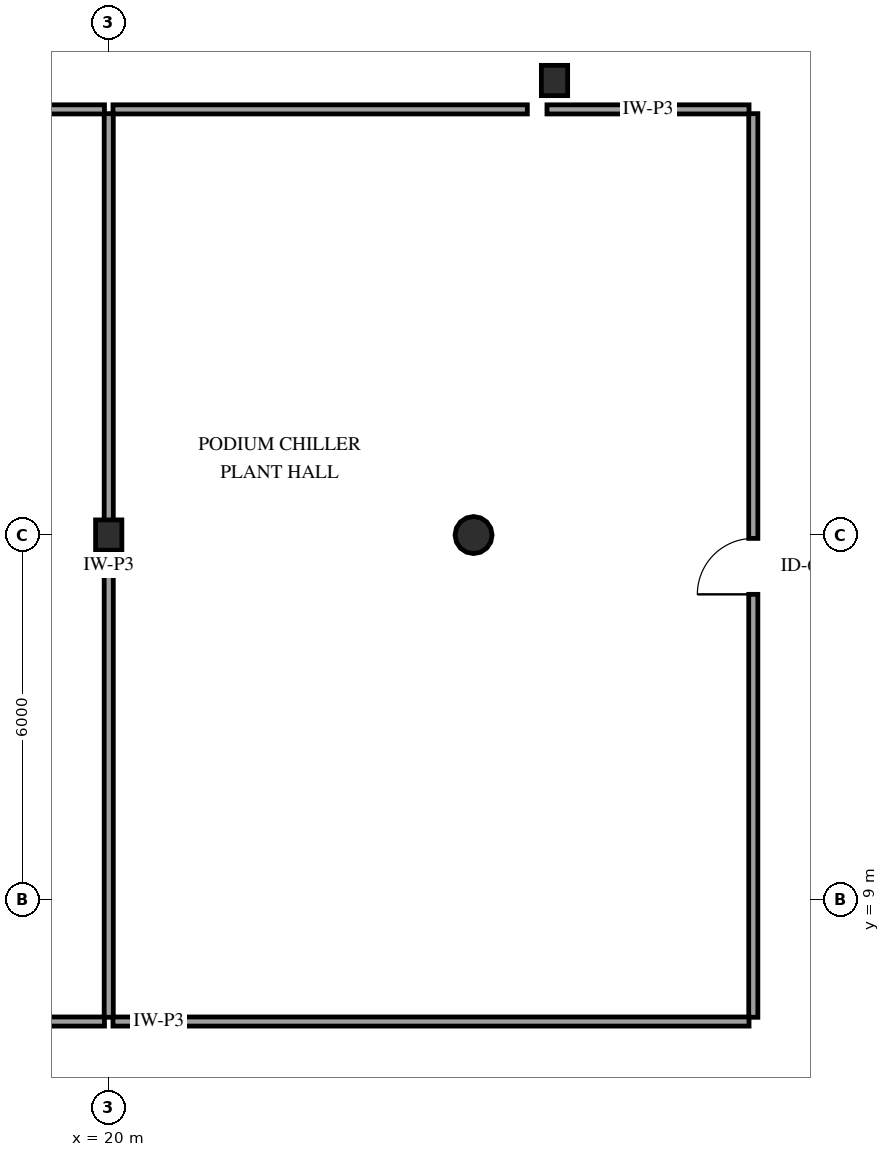
"""IFC4 building model, lengths in metres.
Left out: names, types, materials, properties, quantities, classifications, styles, units other than length and angle.
Written with IfcOpenShell. Run it as: python <this file> out.ifc"""

import sys

from ifc_helpers import new_model, si_unit, direction, frame, frame_2d, origin, origin_2d, place, context, subcontext, project, spatial, rectangle, hollow_circle, i_section, extrude, element, fill, save


model = new_model("IFC4")
c1 = context("Model", 3, precision=1e-05, world=origin(), true_north=direction((0.0, 1.0)))
c2 = subcontext(c1, "Body", "Model", "MODEL_VIEW")
j1 = project(units=[si_unit("LENGTHUNIT", "METRE"), si_unit("PLANEANGLEUNIT", "RADIAN")], contexts=[c1])
p1 = place(None, origin())
s1 = spatial("IfcSite", under=j1, at=p1, CompositionType="ELEMENT")
p2 = place(p1, origin())
s2 = spatial("IfcBuilding", under=s1, at=p2, CompositionType="ELEMENT")
p3 = place(p2, frame((0.0, 0.0, 25.2)))
s3 = spatial("IfcBuildingStorey", under=s2, at=p3, CompositionType="ELEMENT", Elevation=25.2)
p4 = place(p3, frame((20.0, 15.0, 0.0), z_axis=(0.0, 0.0, 1.0), x_axis=(1.0, 0.0, 0.0)))
e1 = element("IfcColumn", 1, at=p4, inside=s3, PredefinedType="COLUMN", context=c2, shape_type="SweptSolid", body=[
    extrude(i_section(OverallWidth=0.432, OverallDepth=0.498, WebThickness=0.056, FlangeThickness=0.089, FilletRadius=0.038, at=origin_2d()), origin(), (0.0, 0.0, 1.0), 5.1),
])
p5 = place(p3, frame((26.0, 15.0, 0.0), z_axis=(0.0, 0.0, 1.0), x_axis=(1.0, 0.0, 0.0)))
e2 = element("IfcColumn", 2, at=p5, inside=s3, PredefinedType="COLUMN", context=c2, shape_type="SweptSolid", body=[
    extrude(hollow_circle(Radius=0.305, WallThickness=0.022, at=origin_2d()), origin(), (0.0, 0.0, 1.0), 5.07),
])
p6 = place(p3, frame((27.331, 22.475, 0.0), z_axis=(0.0, 0.0, 1.0), x_axis=(1.0, 0.0, 0.0)))
e3 = element("IfcColumn", 3, at=p6, inside=s3, PredefinedType="COLUMN", context=c2, shape_type="SweptSolid", body=[
    extrude(i_section(OverallWidth=0.432, OverallDepth=0.498, WebThickness=0.056, FlangeThickness=0.089, FilletRadius=0.038, at=origin_2d()), origin(), (0.0, 0.0, 1.0), 5.1),
])
p7 = place(p3, frame((30.6, 7.07, 0.0), z_axis=(0.0, 0.0, 1.0), x_axis=(0.0, 1.0, 0.0)))
e4 = element("IfcWall", 4, at=p7, inside=s3, PredefinedType="PARTITIONING", context=c2, shape_type="SweptSolid", body=[
    extrude(rectangle(XDim=14.86, YDim=0.15, at=frame_2d((7.43, 0.0))), origin(), (0.0, 0.0, 1.0), 5.1),
])
p8 = place(p7, frame((6.955, 0.0, 0.0)))
e5 = element("IfcOpeningElement", 5, at=p8, cuts=e4, PredefinedType="OPENING", context=c2, shape_type="SweptSolid", body=[
    extrude(rectangle(XDim=0.92, YDim=2.12, at=frame_2d((0.46, 1.06))), frame((0.0, 0.085, 0.0), z_axis=(0.0, -1.0, 0.0), x_axis=(1.0, 0.0, 0.0)), (0.0, 0.0, 1.0), 0.17),
])
p9 = place(p3, frame((20.0, 21.93, 0.0), z_axis=(0.0, 0.0, 1.0), x_axis=(0.0, -1.0, 0.0)))
e6 = element("IfcWall", 6, at=p9, inside=s3, PredefinedType="PARTITIONING", context=c2, shape_type="SweptSolid", body=[
    extrude(rectangle(XDim=14.86, YDim=0.15, at=frame_2d((7.43, 0.0))), origin(), (0.0, 0.0, 1.0), 4.222),
])
p10 = place(p3, frame((20.07, 7.0, 0.0), z_axis=(0.0, 0.0, 1.0), x_axis=(1.0, 0.0, 0.0)))
e7 = element("IfcWall", 7, at=p10, inside=s3, PredefinedType="PARTITIONING", context=c2, shape_type="SweptSolid", body=[
    extrude(rectangle(XDim=10.46, YDim=0.15, at=frame_2d((5.23, 0.0))), origin(), (0.0, 0.0, 1.0), 5.1),
])
p11 = place(p3, frame((11.12, 7.0, 0.0), z_axis=(0.0, 0.0, 1.0), x_axis=(1.0, 0.0, 0.0)))
e8 = element("IfcWall", 8, at=p11, inside=s3, PredefinedType="PARTITIONING", context=c2, shape_type="SweptSolid", body=[
    extrude(rectangle(XDim=8.81, YDim=0.15, at=frame_2d((4.405, 0.0))), origin(), (0.0, 0.0, 1.0), 5.1),
])
p12 = place(p3, frame((19.93, 22.0, 0.0), z_axis=(0.0, 0.0, 1.0), x_axis=(-1.0, 0.0, 0.0)))
e9 = element("IfcWall", 9, at=p12, inside=s3, PredefinedType="PARTITIONING", context=c2, shape_type="SweptSolid", body=[
    extrude(rectangle(XDim=2.28, YDim=0.15, at=frame_2d((1.14, 0.0))), origin(), (0.0, 0.0, 1.0), 5.1),
])
p13 = place(p3, frame((26.884, 22.0, 0.0), z_axis=(0.0, 0.0, 1.0), x_axis=(-1.0, 0.0, 0.0)))
e10 = element("IfcWall", 10, at=p13, inside=s3, PredefinedType="PARTITIONING", context=c2, shape_type="SweptSolid", body=[
    extrude(rectangle(XDim=6.814, YDim=0.15, at=frame_2d((3.407, 0.0))), origin(), (0.0, 0.0, 1.0), 5.1),
])
p14 = place(p3, frame((30.53, 22.0, 0.0), z_axis=(0.0, 0.0, 1.0), x_axis=(-1.0, 0.0, 0.0)))
e11 = element("IfcWall", 11, at=p14, inside=s3, PredefinedType="PARTITIONING", context=c2, shape_type="SweptSolid", body=[
    extrude(rectangle(XDim=3.323, YDim=0.15, at=frame_2d((1.662, 0.0))), origin(), (0.0, 0.0, 1.0), 5.1),
])
p15 = place(p8, origin())
e12 = element("IfcDoor", 12, at=p15, inside=s3, OperationType="SINGLE_SWING_LEFT", PredefinedType="DOOR", context=c2, shape_type="SweptSolid", body=[
    extrude(rectangle(XDim=0.92, YDim=2.12, at=frame_2d((0.46, 1.06))), frame((0.0, 0.025, 0.0), z_axis=(0.0, -1.0, 0.0), x_axis=(1.0, 0.0, 0.0)), (0.0, 0.0, 1.0), 0.05),
])
fill(e5, e12)
save(model, sys.argv[1])
